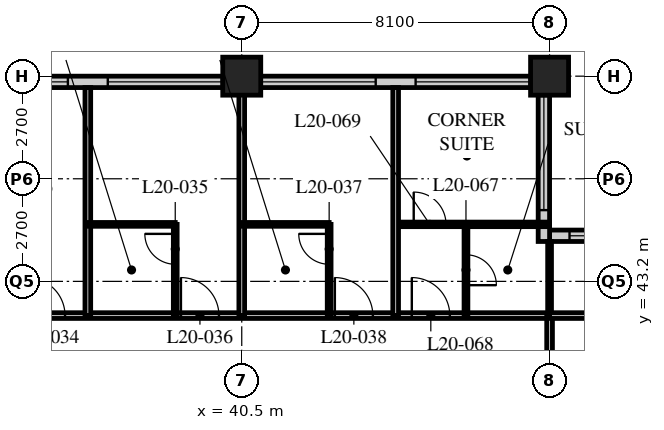
"""IFC4 building model, lengths in metres.
Left out: names, types, materials, properties, quantities, classifications, styles, units other than length and angle.
Written with IfcOpenShell. Run it as: python <this file> out.ifc"""

import sys

from ifc_helpers import new_model, si_unit, direction, frame, frame_2d, origin, origin_2d, place, context, subcontext, project, spatial, rectangle, hollow_rectangle, extrude, element, fill, save


model = new_model("IFC4")
c1 = context("Model", 3, precision=1e-05, world=origin(), true_north=direction((0.0, 1.0)))
c2 = subcontext(c1, "Body", "Model", "MODEL_VIEW")
j1 = project(units=[si_unit("LENGTHUNIT", "METRE"), si_unit("PLANEANGLEUNIT", "RADIAN")], contexts=[c1])
p1 = place(None, origin())
s1 = spatial("IfcSite", under=j1, at=p1, CompositionType="ELEMENT")
p2 = place(p1, origin())
s2 = spatial("IfcBuilding", under=s1, at=p2, CompositionType="ELEMENT")
p3 = place(p2, frame((0.0, 0.0, 80.6)))
s3 = spatial("IfcBuildingStorey", under=s2, at=p3, CompositionType="ELEMENT", Elevation=80.6)
for number, where, z_axis, x_axis in (
    (1, (40.5, 48.6, 0.0), (0.0, 0.0, 1.0), (1.0, 0.0, 0.0)),
    (2, (48.6, 48.6, 0.0), (0.0, 0.0, 1.0), (1.0, 0.0, 0.0)),
):
    element("IfcColumn", number, at=place(p3, frame(where, z_axis=z_axis, x_axis=x_axis)), inside=s3, PredefinedType="COLUMN", context=c2, shape_type="SweptSolid", body=[
        extrude(hollow_rectangle(XDim=1.0, YDim=1.0, WallThickness=0.1, at=origin_2d()), origin(), (0.0, 0.0, 1.0), 3.4),
    ])
p4 = place(p3, frame((52.35, 44.4, 0.0), z_axis=(0.0, 0.0, 1.0), x_axis=(-1.0, 0.0, 0.0)))
e3 = element("IfcWall", 3, at=p4, inside=s3, PredefinedType="SOLIDWALL", context=c2, shape_type="SweptSolid", body=[
    extrude(rectangle(XDim=3.75, YDim=0.3, at=frame_2d((1.875, 0.0))), origin(), (0.0, 0.0, 1.0), 3.19),
])
p5 = place(p4, frame((0.225, 0.0, 0.9)))
e4 = element("IfcOpeningElement", 4, at=p5, cuts=e3, PredefinedType="OPENING", context=c2, shape_type="SweptSolid", body=[
    extrude(rectangle(XDim=3.0, YDim=1.5, at=frame_2d((1.5, 0.75))), frame((0.0, 0.16, 0.0), z_axis=(0.0, -1.0, 0.0), x_axis=(1.0, 0.0, 0.0)), (0.0, 0.0, 1.0), 0.32),
])
p6 = place(p3, frame((48.45, 44.25, 0.0), z_axis=(0.0, 0.0, 1.0), x_axis=(0.0, 1.0, 0.0)))
e5 = element("IfcWall", 5, at=p6, inside=s3, PredefinedType="SOLIDWALL", context=c2, shape_type="SweptSolid", body=[
    extrude(rectangle(XDim=4.35, YDim=0.3, at=frame_2d((2.175, 0.0))), origin(), (0.0, 0.0, 1.0), 3.19),
])
p7 = place(p6, frame((0.825, 0.0, 0.9)))
e6 = element("IfcOpeningElement", 6, at=p7, cuts=e5, PredefinedType="OPENING", context=c2, shape_type="SweptSolid", body=[
    extrude(rectangle(XDim=3.0, YDim=1.5, at=frame_2d((1.5, 0.75))), frame((0.0, 0.16, 0.0), z_axis=(0.0, -1.0, 0.0), x_axis=(1.0, 0.0, 0.0)), (0.0, 0.0, 1.0), 0.32),
])
p8 = place(p3, frame((48.3, 48.45, 0.0), z_axis=(0.0, 0.0, 1.0), x_axis=(-1.0, 0.0, 0.0)))
e7 = element("IfcWall", 7, at=p8, inside=s3, PredefinedType="SOLIDWALL", context=c2, shape_type="SweptSolid", body=[
    extrude(rectangle(XDim=40.2, YDim=0.3, at=frame_2d((20.1, 0.0))), origin(), (0.0, 0.0, 1.0), 3.19),
])
p9 = place(p8, frame((0.225, 0.0, 0.9)))
e8 = element("IfcOpeningElement", 8, at=p9, cuts=e7, PredefinedType="OPENING", context=c2, shape_type="SweptSolid", body=[
    extrude(rectangle(XDim=3.0, YDim=1.5, at=frame_2d((1.5, 0.75))), frame((0.0, 0.16, 0.0), z_axis=(0.0, -1.0, 0.0), x_axis=(1.0, 0.0, 0.0)), (0.0, 0.0, 1.0), 0.32),
])
p10 = place(p8, frame((4.275, 0.0, 0.9)))
e9 = element("IfcOpeningElement", 9, at=p10, cuts=e7, PredefinedType="OPENING", context=c2, shape_type="SweptSolid", body=[
    extrude(rectangle(XDim=3.0, YDim=1.5, at=frame_2d((1.5, 0.75))), frame((0.0, 0.16, 0.0), z_axis=(0.0, -1.0, 0.0), x_axis=(1.0, 0.0, 0.0)), (0.0, 0.0, 1.0), 0.32),
])
p11 = place(p8, frame((8.325, 0.0, 0.9)))
e10 = element("IfcOpeningElement", 10, at=p11, cuts=e7, PredefinedType="OPENING", context=c2, shape_type="SweptSolid", body=[
    extrude(rectangle(XDim=3.0, YDim=1.5, at=frame_2d((1.5, 0.75))), frame((0.0, 0.16, 0.0), z_axis=(0.0, -1.0, 0.0), x_axis=(1.0, 0.0, 0.0)), (0.0, 0.0, 1.0), 0.32),
])
p12 = place(p8, frame((12.375, 0.0, 0.9)))
e11 = element("IfcOpeningElement", 11, at=p12, cuts=e7, PredefinedType="OPENING", context=c2, shape_type="SweptSolid", body=[
    extrude(rectangle(XDim=3.0, YDim=1.5, at=frame_2d((1.5, 0.75))), frame((0.0, 0.16, 0.0), z_axis=(0.0, -1.0, 0.0), x_axis=(1.0, 0.0, 0.0)), (0.0, 0.0, 1.0), 0.32),
])
p13 = place(p8, frame((16.425, 0.0, 0.9)))
e12 = element("IfcOpeningElement", 12, at=p13, cuts=e7, PredefinedType="OPENING", context=c2, shape_type="SweptSolid", body=[
    extrude(rectangle(XDim=3.0, YDim=1.5, at=frame_2d((1.5, 0.75))), frame((0.0, 0.16, 0.0), z_axis=(0.0, -1.0, 0.0), x_axis=(1.0, 0.0, 0.0)), (0.0, 0.0, 1.0), 0.32),
])
p14 = place(p8, frame((20.475, 0.0, 0.9)))
e13 = element("IfcOpeningElement", 13, at=p14, cuts=e7, PredefinedType="OPENING", context=c2, shape_type="SweptSolid", body=[
    extrude(rectangle(XDim=3.0, YDim=1.5, at=frame_2d((1.5, 0.75))), frame((0.0, 0.16, 0.0), z_axis=(0.0, -1.0, 0.0), x_axis=(1.0, 0.0, 0.0)), (0.0, 0.0, 1.0), 0.32),
])
p15 = place(p8, frame((24.525, 0.0, 0.9)))
e14 = element("IfcOpeningElement", 14, at=p15, cuts=e7, PredefinedType="OPENING", context=c2, shape_type="SweptSolid", body=[
    extrude(rectangle(XDim=3.0, YDim=1.5, at=frame_2d((1.5, 0.75))), frame((0.0, 0.16, 0.0), z_axis=(0.0, -1.0, 0.0), x_axis=(1.0, 0.0, 0.0)), (0.0, 0.0, 1.0), 0.32),
])
p16 = place(p8, frame((28.575, 0.0, 0.9)))
e15 = element("IfcOpeningElement", 15, at=p16, cuts=e7, PredefinedType="OPENING", context=c2, shape_type="SweptSolid", body=[
    extrude(rectangle(XDim=3.0, YDim=1.5, at=frame_2d((1.5, 0.75))), frame((0.0, 0.16, 0.0), z_axis=(0.0, -1.0, 0.0), x_axis=(1.0, 0.0, 0.0)), (0.0, 0.0, 1.0), 0.32),
])
p17 = place(p8, frame((32.625, 0.0, 0.9)))
e16 = element("IfcOpeningElement", 16, at=p17, cuts=e7, PredefinedType="OPENING", context=c2, shape_type="SweptSolid", body=[
    extrude(rectangle(XDim=3.0, YDim=1.5, at=frame_2d((1.5, 0.75))), frame((0.0, 0.16, 0.0), z_axis=(0.0, -1.0, 0.0), x_axis=(1.0, 0.0, 0.0)), (0.0, 0.0, 1.0), 0.32),
])
p18 = place(p8, frame((36.675, 0.0, 0.9)))
e17 = element("IfcOpeningElement", 17, at=p18, cuts=e7, PredefinedType="OPENING", context=c2, shape_type="SweptSolid", body=[
    extrude(rectangle(XDim=3.0, YDim=1.5, at=frame_2d((1.5, 0.75))), frame((0.0, 0.16, 0.0), z_axis=(0.0, -1.0, 0.0), x_axis=(1.0, 0.0, 0.0)), (0.0, 0.0, 1.0), 0.32),
])
p19 = place(p3, frame((12.15, 42.3, 0.0), z_axis=(0.0, 0.0, 1.0), x_axis=(1.0, 0.0, 0.0)))
e18 = element("IfcWall", 18, at=p19, inside=s3, PredefinedType="PARTITIONING", context=c2, shape_type="SweptSolid", body=[
    extrude(rectangle(XDim=36.45, YDim=0.15, at=frame_2d((18.225, 0.0))), origin(), (0.0, 0.0, 1.0), 3.19),
])
p20 = place(p19, frame((9.5, 0.0, 0.0)))
e19 = element("IfcOpeningElement", 19, at=p20, cuts=e18, PredefinedType="OPENING", context=c2, shape_type="SweptSolid", body=[
    extrude(rectangle(XDim=1.0, YDim=2.1, at=frame_2d((0.5, 1.05))), frame((0.0, 0.085, 0.0), z_axis=(0.0, -1.0, 0.0), x_axis=(1.0, 0.0, 0.0)), (0.0, 0.0, 1.0), 0.17),
])
p21 = place(p19, frame((17.6, 0.0, 0.0)))
e20 = element("IfcOpeningElement", 20, at=p21, cuts=e18, PredefinedType="OPENING", context=c2, shape_type="SweptSolid", body=[
    extrude(rectangle(XDim=1.0, YDim=2.1, at=frame_2d((0.5, 1.05))), frame((0.0, 0.085, 0.0), z_axis=(0.0, -1.0, 0.0), x_axis=(1.0, 0.0, 0.0)), (0.0, 0.0, 1.0), 0.17),
])
p22 = place(p19, frame((22.7, 0.0, 0.0)))
e21 = element("IfcOpeningElement", 21, at=p22, cuts=e18, PredefinedType="OPENING", context=c2, shape_type="SweptSolid", body=[
    extrude(rectangle(XDim=1.0, YDim=2.1, at=frame_2d((0.5, 1.05))), frame((0.0, 0.085, 0.0), z_axis=(0.0, -1.0, 0.0), x_axis=(1.0, 0.0, 0.0)), (0.0, 0.0, 1.0), 0.17),
])
p23 = place(p19, frame((26.75, 0.0, 0.0)))
e22 = element("IfcOpeningElement", 22, at=p23, cuts=e18, PredefinedType="OPENING", context=c2, shape_type="SweptSolid", body=[
    extrude(rectangle(XDim=1.0, YDim=2.1, at=frame_2d((0.5, 1.05))), frame((0.0, 0.085, 0.0), z_axis=(0.0, -1.0, 0.0), x_axis=(1.0, 0.0, 0.0)), (0.0, 0.0, 1.0), 0.17),
])
p24 = place(p19, frame((30.8, 0.0, 0.0)))
e23 = element("IfcOpeningElement", 23, at=p24, cuts=e18, PredefinedType="OPENING", context=c2, shape_type="SweptSolid", body=[
    extrude(rectangle(XDim=1.0, YDim=2.1, at=frame_2d((0.5, 1.05))), frame((0.0, 0.085, 0.0), z_axis=(0.0, -1.0, 0.0), x_axis=(1.0, 0.0, 0.0)), (0.0, 0.0, 1.0), 0.17),
])
p25 = place(p19, frame((32.825, 0.0, 0.0)))
e24 = element("IfcOpeningElement", 24, at=p25, cuts=e18, PredefinedType="OPENING", context=c2, shape_type="SweptSolid", body=[
    extrude(rectangle(XDim=1.0, YDim=2.1, at=frame_2d((0.5, 1.05))), frame((0.0, 0.085, 0.0), z_axis=(0.0, -1.0, 0.0), x_axis=(1.0, 0.0, 0.0)), (0.0, 0.0, 1.0), 0.17),
])
p26 = place(p19, frame((2.375, 0.0, 0.0)))
e25 = element("IfcOpeningElement", 25, at=p26, cuts=e18, PredefinedType="OPENING", context=c2, shape_type="SweptSolid", body=[
    extrude(rectangle(XDim=1.0, YDim=2.1, at=frame_2d((0.5, 1.05))), frame((0.0, 0.085, 0.0), z_axis=(0.0, -1.0, 0.0), x_axis=(1.0, 0.0, 0.0)), (0.0, 0.0, 1.0), 0.17),
])
p27 = place(p3, frame((48.6, 16.2, 0.0), z_axis=(0.0, 0.0, 1.0), x_axis=(0.0, 1.0, 0.0)))
e26 = element("IfcWall", 26, at=p27, inside=s3, PredefinedType="PARTITIONING", context=c2, shape_type="SweptSolid", body=[
    extrude(rectangle(XDim=26.1, YDim=0.15, at=frame_2d((13.05, 0.0))), origin(), (0.0, 0.0, 1.0), 2.428),
])
p28 = place(p27, frame((2.75, 0.0, 0.0)))
e27 = element("IfcOpeningElement", 27, at=p28, cuts=e26, PredefinedType="OPENING", context=c2, shape_type="SweptSolid", body=[
    extrude(rectangle(XDim=1.0, YDim=2.1, at=frame_2d((0.5, 1.05))), frame((0.0, 0.085, 0.0), z_axis=(0.0, -1.0, 0.0), x_axis=(1.0, 0.0, 0.0)), (0.0, 0.0, 1.0), 0.17),
])
p29 = place(p27, frame((4.65, 0.0, 0.0)))
e28 = element("IfcOpeningElement", 28, at=p29, cuts=e26, PredefinedType="OPENING", context=c2, shape_type="SweptSolid", body=[
    extrude(rectangle(XDim=1.0, YDim=2.1, at=frame_2d((0.5, 1.05))), frame((0.0, 0.085, 0.0), z_axis=(0.0, -1.0, 0.0), x_axis=(1.0, 0.0, 0.0)), (0.0, 0.0, 1.0), 0.17),
])
p30 = place(p27, frame((13.55, 0.0, 0.0)))
e29 = element("IfcOpeningElement", 29, at=p30, cuts=e26, PredefinedType="OPENING", context=c2, shape_type="SweptSolid", body=[
    extrude(rectangle(XDim=1.0, YDim=2.1, at=frame_2d((0.5, 1.05))), frame((0.0, 0.085, 0.0), z_axis=(0.0, -1.0, 0.0), x_axis=(1.0, 0.0, 0.0)), (0.0, 0.0, 1.0), 0.17),
])
p31 = place(p27, frame((21.65, 0.0, 0.0)))
e30 = element("IfcOpeningElement", 30, at=p31, cuts=e26, PredefinedType="OPENING", context=c2, shape_type="SweptSolid", body=[
    extrude(rectangle(XDim=1.0, YDim=2.1, at=frame_2d((0.5, 1.05))), frame((0.0, 0.085, 0.0), z_axis=(0.0, -1.0, 0.0), x_axis=(1.0, 0.0, 0.0)), (0.0, 0.0, 1.0), 0.17),
])
p32 = place(p3, frame((36.45, 42.3, 0.0), z_axis=(0.0, 0.0, 1.0), x_axis=(0.0, 1.0, 0.0)))
e31 = element("IfcWall", 31, at=p32, inside=s3, PredefinedType="PARTITIONING", context=c2, shape_type="SweptSolid", body=[
    extrude(rectangle(XDim=6.0, YDim=0.15, at=frame_2d((3.0, 0.0))), origin(), (0.0, 0.0, 1.0), 3.19),
])
p33 = place(p3, frame((36.45, 44.7, 0.0), z_axis=(0.0, 0.0, 1.0), x_axis=(1.0, 0.0, 0.0)))
e32 = element("IfcWall", 32, at=p33, inside=s3, PredefinedType="PARTITIONING", context=c2, shape_type="SweptSolid", body=[
    extrude(rectangle(XDim=2.3, YDim=0.1, at=frame_2d((1.15, 0.0))), origin(), (0.0, 0.0, 1.0), 3.19),
])
p34 = place(p3, frame((38.75, 42.3, 0.0), z_axis=(0.0, 0.0, 1.0), x_axis=(0.0, 1.0, 0.0)))
e33 = element("IfcWall", 33, at=p34, inside=s3, PredefinedType="PARTITIONING", context=c2, shape_type="SweptSolid", body=[
    extrude(rectangle(XDim=2.4, YDim=0.1, at=frame_2d((1.2, 0.0))), origin(), (0.0, 0.0, 1.0), 3.19),
])
p35 = place(p34, frame((1.35, 0.0, 0.0)))
e34 = element("IfcOpeningElement", 34, at=p35, cuts=e33, PredefinedType="OPENING", context=c2, shape_type="SweptSolid", body=[
    extrude(rectangle(XDim=0.8, YDim=2.1, at=frame_2d((0.4, 1.05))), frame((0.0, 0.06, 0.0), z_axis=(0.0, -1.0, 0.0), x_axis=(1.0, 0.0, 0.0)), (0.0, 0.0, 1.0), 0.12),
])
p36 = place(p3, frame((40.5, 42.3, 0.0), z_axis=(0.0, 0.0, 1.0), x_axis=(0.0, 1.0, 0.0)))
e35 = element("IfcWall", 35, at=p36, inside=s3, PredefinedType="PARTITIONING", context=c2, shape_type="SweptSolid", body=[
    extrude(rectangle(XDim=6.0, YDim=0.15, at=frame_2d((3.0, 0.0))), origin(), (0.0, 0.0, 1.0), 2.428),
])
p37 = place(p3, frame((40.5, 44.7, 0.0), z_axis=(0.0, 0.0, 1.0), x_axis=(1.0, 0.0, 0.0)))
e36 = element("IfcWall", 36, at=p37, inside=s3, PredefinedType="PARTITIONING", context=c2, shape_type="SweptSolid", body=[
    extrude(rectangle(XDim=2.3, YDim=0.1, at=frame_2d((1.15, 0.0))), origin(), (0.0, 0.0, 1.0), 3.19),
])
p38 = place(p3, frame((42.8, 42.3, 0.0), z_axis=(0.0, 0.0, 1.0), x_axis=(0.0, 1.0, 0.0)))
e37 = element("IfcWall", 37, at=p38, inside=s3, PredefinedType="PARTITIONING", context=c2, shape_type="SweptSolid", body=[
    extrude(rectangle(XDim=2.4, YDim=0.1, at=frame_2d((1.2, 0.0))), origin(), (0.0, 0.0, 1.0), 3.19),
])
p39 = place(p38, frame((1.35, 0.0, 0.0)))
e38 = element("IfcOpeningElement", 38, at=p39, cuts=e37, PredefinedType="OPENING", context=c2, shape_type="SweptSolid", body=[
    extrude(rectangle(XDim=0.8, YDim=2.1, at=frame_2d((0.4, 1.05))), frame((0.0, 0.06, 0.0), z_axis=(0.0, -1.0, 0.0), x_axis=(1.0, 0.0, 0.0)), (0.0, 0.0, 1.0), 0.12),
])
p40 = place(p3, frame((44.55, 44.7, 0.0), z_axis=(0.0, 0.0, 1.0), x_axis=(1.0, 0.0, 0.0)))
e39 = element("IfcWall", 39, at=p40, inside=s3, PredefinedType="PARTITIONING", context=c2, shape_type="SweptSolid", body=[
    extrude(rectangle(XDim=4.05, YDim=0.12, at=frame_2d((2.025, 0.0))), origin(), (0.0, 0.0, 1.0), 3.19),
])
p41 = place(p40, frame((0.475, 0.0, 0.0)))
e40 = element("IfcOpeningElement", 40, at=p41, cuts=e39, PredefinedType="OPENING", context=c2, shape_type="SweptSolid", body=[
    extrude(rectangle(XDim=0.85, YDim=2.1, at=frame_2d((0.425, 1.05))), frame((0.0, 0.07, 0.0), z_axis=(0.0, -1.0, 0.0), x_axis=(1.0, 0.0, 0.0)), (0.0, 0.0, 1.0), 0.14),
])
p42 = place(p3, frame((46.4, 42.3, 0.0), z_axis=(0.0, 0.0, 1.0), x_axis=(0.0, 1.0, 0.0)))
e41 = element("IfcWall", 41, at=p42, inside=s3, PredefinedType="PARTITIONING", context=c2, shape_type="SweptSolid", body=[
    extrude(rectangle(XDim=2.4, YDim=0.1, at=frame_2d((1.2, 0.0))), origin(), (0.0, 0.0, 1.0), 3.19),
])
p43 = place(p42, frame((0.8, 0.0, 0.0)))
e42 = element("IfcOpeningElement", 42, at=p43, cuts=e41, PredefinedType="OPENING", context=c2, shape_type="SweptSolid", body=[
    extrude(rectangle(XDim=0.8, YDim=2.1, at=frame_2d((0.4, 1.05))), frame((0.0, 0.06, 0.0), z_axis=(0.0, -1.0, 0.0), x_axis=(1.0, 0.0, 0.0)), (0.0, 0.0, 1.0), 0.12),
])
p44 = place(p3, frame((48.6, 42.3, 0.0), z_axis=(0.0, 0.0, 1.0), x_axis=(0.0, 1.0, 0.0)))
e43 = element("IfcWall", 43, at=p44, inside=s3, PredefinedType="PARTITIONING", context=c2, shape_type="SweptSolid", body=[
    extrude(rectangle(XDim=1.95, YDim=0.1, at=frame_2d((0.975, 0.0))), origin(), (0.0, 0.0, 1.0), 2.428),
])
p45 = place(p3, frame((48.6, 42.3, 0.0), z_axis=(0.0, 0.0, 1.0), x_axis=(1.0, 0.0, 0.0)))
e44 = element("IfcWall", 44, at=p45, inside=s3, PredefinedType="PARTITIONING", context=c2, shape_type="SweptSolid", body=[
    extrude(rectangle(XDim=3.75, YDim=0.15, at=frame_2d((1.875, 0.0))), origin(), (0.0, 0.0, 1.0), 3.19),
])
p46 = place(p3, frame((44.55, 42.3, 0.0), z_axis=(0.0, 0.0, 1.0), x_axis=(0.0, 1.0, 0.0)))
e45 = element("IfcWall", 45, at=p46, inside=s3, PredefinedType="PARTITIONING", context=c2, shape_type="SweptSolid", body=[
    extrude(rectangle(XDim=6.0, YDim=0.15, at=frame_2d((3.0, 0.0))), origin(), (0.0, 0.0, 1.0), 3.19),
])
p47 = place(p5, origin())
e46 = element("IfcWindow", 46, at=p47, inside=s3, PartitioningType="SINGLE_PANEL", PredefinedType="WINDOW", context=c2, shape_type="SweptSolid", body=[
    extrude(rectangle(XDim=3.0, YDim=1.5, at=frame_2d((1.5, 0.75))), frame((0.0, 0.03, 0.0), z_axis=(0.0, -1.0, 0.0), x_axis=(1.0, 0.0, 0.0)), (0.0, 0.0, 1.0), 0.06),
])
fill(e4, e46)
p48 = place(p7, origin())
e47 = element("IfcWindow", 47, at=p48, inside=s3, PartitioningType="SINGLE_PANEL", PredefinedType="WINDOW", context=c2, shape_type="SweptSolid", body=[
    extrude(rectangle(XDim=3.0, YDim=1.5, at=frame_2d((1.5, 0.75))), frame((0.0, 0.03, 0.0), z_axis=(0.0, -1.0, 0.0), x_axis=(1.0, 0.0, 0.0)), (0.0, 0.0, 1.0), 0.06),
])
fill(e6, e47)
p49 = place(p9, origin())
e48 = element("IfcWindow", 48, at=p49, inside=s3, PartitioningType="SINGLE_PANEL", PredefinedType="WINDOW", context=c2, shape_type="SweptSolid", body=[
    extrude(rectangle(XDim=3.0, YDim=1.5, at=frame_2d((1.5, 0.75))), frame((0.0, 0.03, 0.0), z_axis=(0.0, -1.0, 0.0), x_axis=(1.0, 0.0, 0.0)), (0.0, 0.0, 1.0), 0.06),
])
fill(e8, e48)
p50 = place(p10, origin())
e49 = element("IfcWindow", 49, at=p50, inside=s3, PartitioningType="SINGLE_PANEL", PredefinedType="WINDOW", context=c2, shape_type="SweptSolid", body=[
    extrude(rectangle(XDim=3.0, YDim=1.5, at=frame_2d((1.5, 0.75))), frame((0.0, 0.03, 0.0), z_axis=(0.0, -1.0, 0.0), x_axis=(1.0, 0.0, 0.0)), (0.0, 0.0, 1.0), 0.06),
])
fill(e9, e49)
p51 = place(p11, origin())
e50 = element("IfcWindow", 50, at=p51, inside=s3, PartitioningType="SINGLE_PANEL", PredefinedType="WINDOW", context=c2, shape_type="SweptSolid", body=[
    extrude(rectangle(XDim=3.0, YDim=1.5, at=frame_2d((1.5, 0.75))), frame((0.0, 0.03, 0.0), z_axis=(0.0, -1.0, 0.0), x_axis=(1.0, 0.0, 0.0)), (0.0, 0.0, 1.0), 0.06),
])
fill(e10, e50)
p52 = place(p12, origin())
e51 = element("IfcWindow", 51, at=p52, inside=s3, PartitioningType="SINGLE_PANEL", PredefinedType="WINDOW", context=c2, shape_type="SweptSolid", body=[
    extrude(rectangle(XDim=3.0, YDim=1.5, at=frame_2d((1.5, 0.75))), frame((0.0, 0.03, 0.0), z_axis=(0.0, -1.0, 0.0), x_axis=(1.0, 0.0, 0.0)), (0.0, 0.0, 1.0), 0.06),
])
fill(e11, e51)
p53 = place(p22, origin())
e52 = element("IfcDoor", 52, at=p53, inside=s3, OperationType="SINGLE_SWING_LEFT", PredefinedType="DOOR", context=c2, shape_type="SweptSolid", body=[
    extrude(rectangle(XDim=1.0, YDim=2.1, at=frame_2d((0.5, 1.05))), frame((0.0, 0.025, 0.0), z_axis=(0.0, -1.0, 0.0), x_axis=(1.0, 0.0, 0.0)), (0.0, 0.0, 1.0), 0.05),
])
fill(e21, e52)
p54 = place(p35, origin())
e53 = element("IfcDoor", 53, at=p54, inside=s3, OperationType="SINGLE_SWING_RIGHT", PredefinedType="DOOR", context=c2, shape_type="SweptSolid", body=[
    extrude(rectangle(XDim=0.8, YDim=2.1, at=frame_2d((0.4, 1.05))), frame((0.0, 0.025, 0.0), z_axis=(0.0, -1.0, 0.0), x_axis=(1.0, 0.0, 0.0)), (0.0, 0.0, 1.0), 0.05),
])
fill(e34, e53)
p55 = place(p23, origin())
e54 = element("IfcDoor", 54, at=p55, inside=s3, OperationType="SINGLE_SWING_LEFT", PredefinedType="DOOR", context=c2, shape_type="SweptSolid", body=[
    extrude(rectangle(XDim=1.0, YDim=2.1, at=frame_2d((0.5, 1.05))), frame((0.0, 0.025, 0.0), z_axis=(0.0, -1.0, 0.0), x_axis=(1.0, 0.0, 0.0)), (0.0, 0.0, 1.0), 0.05),
])
fill(e22, e54)
p56 = place(p39, origin())
e55 = element("IfcDoor", 55, at=p56, inside=s3, OperationType="SINGLE_SWING_RIGHT", PredefinedType="DOOR", context=c2, shape_type="SweptSolid", body=[
    extrude(rectangle(XDim=0.8, YDim=2.1, at=frame_2d((0.4, 1.05))), frame((0.0, 0.025, 0.0), z_axis=(0.0, -1.0, 0.0), x_axis=(1.0, 0.0, 0.0)), (0.0, 0.0, 1.0), 0.05),
])
fill(e38, e55)
p57 = place(p24, origin())
e56 = element("IfcDoor", 56, at=p57, inside=s3, OperationType="SINGLE_SWING_LEFT", PredefinedType="DOOR", context=c2, shape_type="SweptSolid", body=[
    extrude(rectangle(XDim=1.0, YDim=2.1, at=frame_2d((0.5, 1.05))), frame((0.0, 0.025, 0.0), z_axis=(0.0, -1.0, 0.0), x_axis=(1.0, 0.0, 0.0)), (0.0, 0.0, 1.0), 0.05),
])
fill(e23, e56)
p58 = place(p43, origin())
e57 = element("IfcDoor", 57, at=p58, inside=s3, OperationType="SINGLE_SWING_RIGHT", PredefinedType="DOOR", context=c2, shape_type="SweptSolid", body=[
    extrude(rectangle(XDim=0.8, YDim=2.1, at=frame_2d((0.4, 1.05))), frame((0.0, 0.025, 0.0), z_axis=(0.0, -1.0, 0.0), x_axis=(1.0, 0.0, 0.0)), (0.0, 0.0, 1.0), 0.05),
])
fill(e42, e57)
p59 = place(p25, origin())
e58 = element("IfcDoor", 58, at=p59, inside=s3, OperationType="SINGLE_SWING_LEFT", PredefinedType="DOOR", context=c2, shape_type="SweptSolid", body=[
    extrude(rectangle(XDim=1.0, YDim=2.1, at=frame_2d((0.5, 1.05))), frame((0.0, 0.025, 0.0), z_axis=(0.0, -1.0, 0.0), x_axis=(1.0, 0.0, 0.0)), (0.0, 0.0, 1.0), 0.05),
])
fill(e24, e58)
p60 = place(p41, origin())
e59 = element("IfcDoor", 59, at=p60, inside=s3, OperationType="SINGLE_SWING_LEFT", PredefinedType="DOOR", context=c2, shape_type="SweptSolid", body=[
    extrude(rectangle(XDim=0.85, YDim=2.1, at=frame_2d((0.425, 1.05))), frame((0.0, 0.025, 0.0), z_axis=(0.0, -1.0, 0.0), x_axis=(1.0, 0.0, 0.0)), (0.0, 0.0, 1.0), 0.05),
])
fill(e40, e59)
save(model, sys.argv[1])
